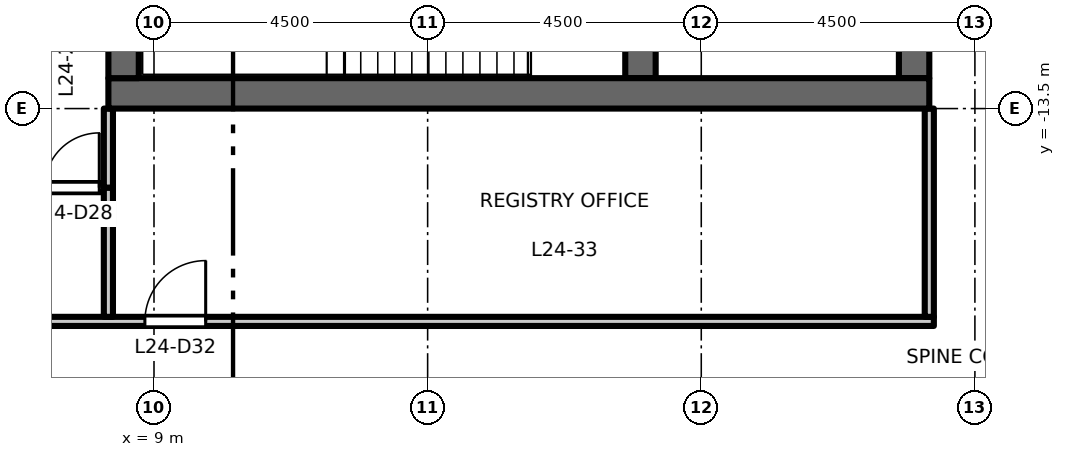
"""IFC4 building model, lengths in metres.
Left out: names, types, materials, properties, quantities, classifications, styles, units other than length and angle.
Written with IfcOpenShell. Run it as: python <this file> out.ifc"""

import sys

from ifc_helpers import new_model, si_unit, direction, frame, frame_2d, origin, place, context, subcontext, project, spatial, rectangle, extrude, element, fill, save


model = new_model("IFC4")
c1 = context("Model", 3, precision=1e-05, world=origin(), true_north=direction((0.0, 1.0)))
c2 = subcontext(c1, "Body", "Model", "MODEL_VIEW")
j1 = project(units=[si_unit("LENGTHUNIT", "METRE"), si_unit("PLANEANGLEUNIT", "RADIAN")], contexts=[c1])
p1 = place(None, origin())
s1 = spatial("IfcSite", under=j1, at=p1, CompositionType="ELEMENT")
p2 = place(p1, origin())
s2 = spatial("IfcBuilding", under=s1, at=p2, CompositionType="ELEMENT")
p3 = place(p2, frame((0.0, 0.0, 113.7)))
s3 = spatial("IfcBuildingStorey", under=s2, at=p3, CompositionType="ELEMENT", Elevation=113.7)
p4 = place(p3, frame((21.5, -13.0, 0.0), z_axis=(0.0, 0.0, 1.0), x_axis=(0.0, 1.0, 0.0)))
e1 = element("IfcWall", 1, at=p4, inside=s3, PredefinedType="SHEAR", context=c2, shape_type="SweptSolid", body=[
    extrude(rectangle(XDim=26.0, YDim=0.5, at=frame_2d((13.0, 0.0))), origin(), (0.0, 0.0, 1.0), 4.35),
])
p5 = place(p4, frame((16.825, 0.0, 0.0)))
e2 = element("IfcOpeningElement", 2, at=p5, cuts=e1, PredefinedType="OPENING", context=c2, shape_type="SweptSolid", body=[
    extrude(rectangle(XDim=1.8, YDim=2.1, at=frame_2d((0.9, 1.05))), frame((0.0, 0.26, 0.0), z_axis=(0.0, -1.0, 0.0), x_axis=(1.0, 0.0, 0.0)), (0.0, 0.0, 1.0), 0.52),
])
p6 = place(p4, frame((7.375, 0.0, 0.0)))
e3 = element("IfcOpeningElement", 3, at=p6, cuts=e1, PredefinedType="OPENING", context=c2, shape_type="SweptSolid", body=[
    extrude(rectangle(XDim=1.8, YDim=2.1, at=frame_2d((0.9, 1.05))), frame((0.0, 0.26, 0.0), z_axis=(0.0, -1.0, 0.0), x_axis=(1.0, 0.0, 0.0)), (0.0, 0.0, 1.0), 0.52),
])
p7 = place(p4, frame((23.4, 0.0, 0.0)))
e4 = element("IfcOpeningElement", 4, at=p7, cuts=e1, PredefinedType="OPENING", context=c2, shape_type="SweptSolid", body=[
    extrude(rectangle(XDim=0.9, YDim=2.1, at=frame_2d((0.45, 1.05))), frame((0.0, 0.26, 0.0), z_axis=(0.0, -1.0, 0.0), x_axis=(1.0, 0.0, 0.0)), (0.0, 0.0, 1.0), 0.52),
])
p8 = place(p3, frame((17.0, -13.0, 0.0), z_axis=(0.0, 0.0, 1.0), x_axis=(0.0, 1.0, 0.0)))
e5 = element("IfcWall", 5, at=p8, inside=s3, PredefinedType="SHEAR", context=c2, shape_type="SweptSolid", body=[
    extrude(rectangle(XDim=6.575, YDim=0.5, at=frame_2d((3.288, 0.0))), origin(), (0.0, 0.0, 1.0), 4.35),
])
p9 = place(p3, frame((8.25, -13.25, 0.0), z_axis=(0.0, 0.0, 1.0), x_axis=(1.0, 0.0, 0.0)))
e6 = element("IfcWall", 6, at=p9, inside=s3, PredefinedType="SHEAR", context=c2, shape_type="SweptSolid", body=[
    extrude(rectangle(XDim=13.5, YDim=0.5, at=frame_2d((6.75, 0.0))), origin(), (0.0, 0.0, 1.0), 4.35),
])
p10 = place(p3, frame((8.5, -13.0, 0.0), z_axis=(0.0, 0.0, 1.0), x_axis=(0.0, 1.0, 0.0)))
e7 = element("IfcWall", 7, at=p10, inside=s3, PredefinedType="SHEAR", context=c2, shape_type="SweptSolid", body=[
    extrude(rectangle(XDim=26.0, YDim=0.5, at=frame_2d((13.0, 0.0))), origin(), (0.0, 0.0, 1.0), 4.35),
])
p11 = place(p3, frame((-21.825, -17.0, 0.0), z_axis=(0.0, 0.0, 1.0), x_axis=(1.0, 0.0, 0.0)))
e8 = element("IfcWall", 8, at=p11, inside=s3, PredefinedType="PARTITIONING", context=c2, shape_type="SweptSolid", body=[
    extrude(rectangle(XDim=43.65, YDim=0.15, at=frame_2d((21.825, 0.0))), origin(), (0.0, 0.0, 1.0), 4.35),
])
p12 = place(p11, frame((14.175, 0.0, 0.0)))
e9 = element("IfcOpeningElement", 9, at=p12, cuts=e8, PredefinedType="OPENING", context=c2, shape_type="SweptSolid", body=[
    extrude(rectangle(XDim=1.0, YDim=2.1, at=frame_2d((0.5, 1.05))), frame((0.0, 0.085, 0.0), z_axis=(0.0, -1.0, 0.0), x_axis=(1.0, 0.0, 0.0)), (0.0, 0.0, 1.0), 0.17),
])
p13 = place(p11, frame((11.925, 0.0, 0.0)))
e10 = element("IfcOpeningElement", 10, at=p13, cuts=e8, PredefinedType="OPENING", context=c2, shape_type="SweptSolid", body=[
    extrude(rectangle(XDim=1.0, YDim=2.1, at=frame_2d((0.5, 1.05))), frame((0.0, 0.085, 0.0), z_axis=(0.0, -1.0, 0.0), x_axis=(1.0, 0.0, 0.0)), (0.0, 0.0, 1.0), 0.17),
])
p14 = place(p11, frame((30.675, 0.0, 0.0)))
e11 = element("IfcOpeningElement", 11, at=p14, cuts=e8, PredefinedType="OPENING", context=c2, shape_type="SweptSolid", body=[
    extrude(rectangle(XDim=1.0, YDim=2.1, at=frame_2d((0.5, 1.05))), frame((0.0, 0.085, 0.0), z_axis=(0.0, -1.0, 0.0), x_axis=(1.0, 0.0, 0.0)), (0.0, 0.0, 1.0), 0.17),
])
p15 = place(p3, frame((6.92, -14.8, 0.0), z_axis=(0.0, 0.0, 1.0), x_axis=(1.0, 0.0, 0.0)))
e12 = element("IfcWall", 12, at=p15, inside=s3, PredefinedType="PARTITIONING", context=c2, shape_type="SweptSolid", body=[
    extrude(rectangle(XDim=1.255, YDim=0.15, at=frame_2d((0.627, 0.0))), origin(), (0.0, 0.0, 1.0), 4.35),
])
p16 = place(p15, frame((0.28, 0.0, 0.0)))
e13 = element("IfcOpeningElement", 13, at=p16, cuts=e12, PredefinedType="OPENING", context=c2, shape_type="SweptSolid", body=[
    extrude(rectangle(XDim=0.9, YDim=2.1, at=frame_2d((0.45, 1.05))), frame((0.0, 0.085, 0.0), z_axis=(0.0, -1.0, 0.0), x_axis=(1.0, 0.0, 0.0)), (0.0, 0.0, 1.0), 0.17),
])
p17 = place(p3, frame((8.25, -16.925, 0.0), z_axis=(0.0, 0.0, 1.0), x_axis=(0.0, 1.0, 0.0)))
e14 = element("IfcWall", 14, at=p17, inside=s3, PredefinedType="PARTITIONING", context=c2, shape_type="SweptSolid", body=[
    extrude(rectangle(XDim=2.125, YDim=0.15, at=frame_2d((1.062, 0.0))), origin(), (0.0, 0.0, 1.0), 4.35),
])
p18 = place(p3, frame((8.25, -14.8, 0.0), z_axis=(0.0, 0.0, 1.0), x_axis=(0.0, 1.0, 0.0)))
e15 = element("IfcWall", 15, at=p18, inside=s3, PredefinedType="PARTITIONING", context=c2, shape_type="SweptSolid", body=[
    extrude(rectangle(XDim=1.3, YDim=0.15, at=frame_2d((0.65, 0.0))), origin(), (0.0, 0.0, 1.0), 4.35),
])
p19 = place(p3, frame((21.75, -16.925, 0.0), z_axis=(0.0, 0.0, 1.0), x_axis=(0.0, 1.0, 0.0)))
e16 = element("IfcWall", 16, at=p19, inside=s3, PredefinedType="PARTITIONING", context=c2, shape_type="SweptSolid", body=[
    extrude(rectangle(XDim=3.425, YDim=0.15, at=frame_2d((1.712, 0.0))), origin(), (0.0, 0.0, 1.0), 4.35),
])
p20 = place(p16, origin())
e17 = element("IfcDoor", 17, at=p20, inside=s3, OperationType="SINGLE_SWING_RIGHT", PredefinedType="DOOR", context=c2, shape_type="SweptSolid", body=[
    extrude(rectangle(XDim=0.9, YDim=2.1, at=frame_2d((0.45, 1.05))), frame((0.0, 0.025, 0.0), z_axis=(0.0, -1.0, 0.0), x_axis=(1.0, 0.0, 0.0)), (0.0, 0.0, 1.0), 0.05),
])
fill(e13, e17)
p21 = place(p14, origin())
e18 = element("IfcDoor", 18, at=p21, inside=s3, OperationType="SINGLE_SWING_RIGHT", PredefinedType="DOOR", context=c2, shape_type="SweptSolid", body=[
    extrude(rectangle(XDim=1.0, YDim=2.1, at=frame_2d((0.5, 1.05))), frame((0.0, 0.025, 0.0), z_axis=(0.0, -1.0, 0.0), x_axis=(1.0, 0.0, 0.0)), (0.0, 0.0, 1.0), 0.05),
])
fill(e11, e18)
save(model, sys.argv[1])
